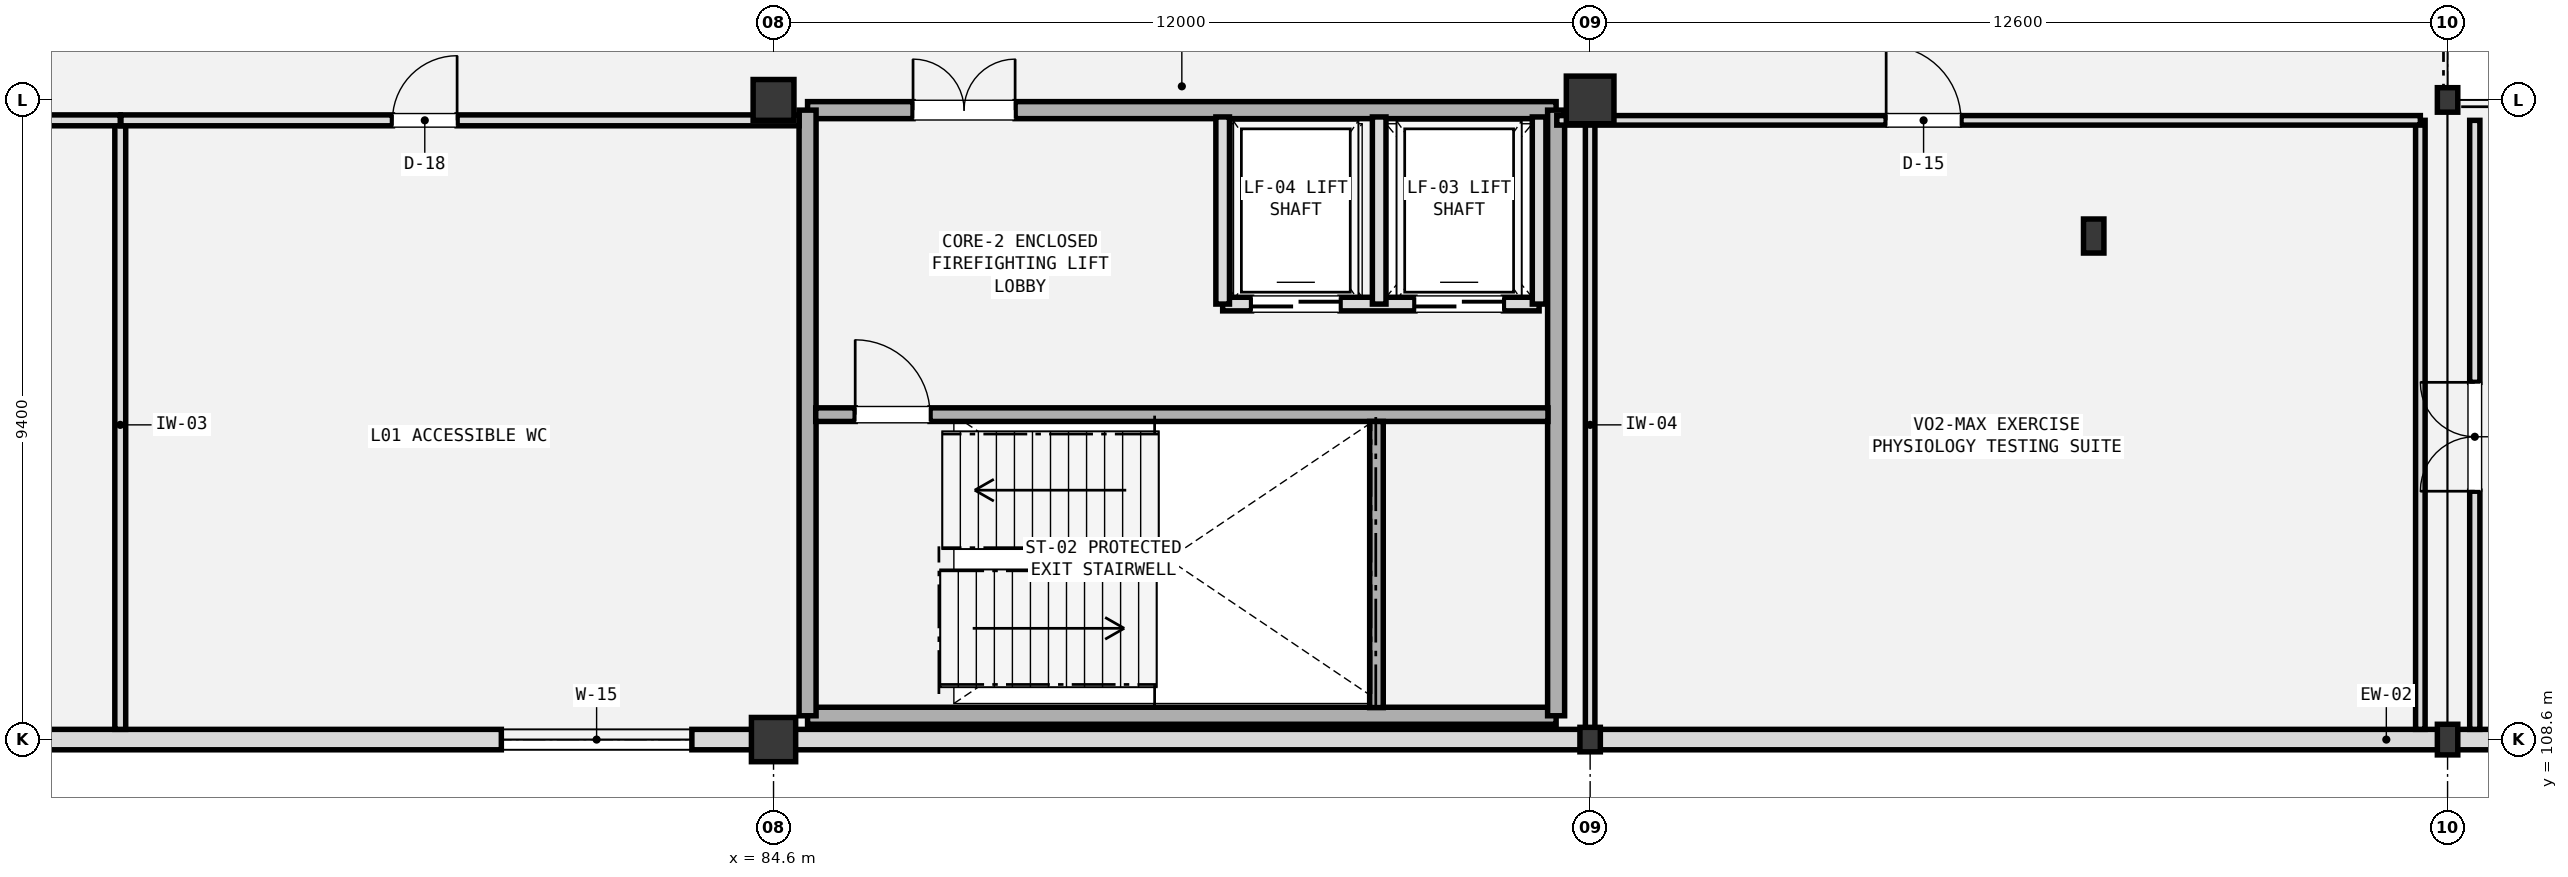
"""IFC4 building model, lengths in metres.
Left out: names, types, materials, properties, quantities, classifications, styles, units other than length and angle.
Written with IfcOpenShell. Run it as: python <this file> out.ifc"""

import sys

from ifc_helpers import new_model, si_unit, direction, frame, frame_2d, origin, origin_2d, place, context, subcontext, project, spatial, rectangle, i_section, extrude, element, fill, save


model = new_model("IFC4")
c1 = context("Model", 3, precision=1e-05, world=origin(), true_north=direction((0.0, 1.0)))
c2 = subcontext(c1, "Body", "Model", "MODEL_VIEW")
j1 = project(units=[si_unit("LENGTHUNIT", "METRE"), si_unit("PLANEANGLEUNIT", "RADIAN")], contexts=[c1])
p1 = place(None, origin())
s1 = spatial("IfcSite", under=j1, at=p1, CompositionType="ELEMENT")
p2 = place(p1, origin())
s2 = spatial("IfcBuilding", under=s1, at=p2, CompositionType="ELEMENT")
p3 = place(p2, frame((0.0, 0.0, 5.4)))
s3 = spatial("IfcBuildingStorey", under=s2, at=p3, CompositionType="ELEMENT", Elevation=5.4)
p4 = place(p3, frame((84.6, 108.6, 0.0), z_axis=(0.0, 0.0, 1.0), x_axis=(1.0, 0.0, 0.0)))
e1 = element("IfcColumn", 1, at=p4, inside=s3, PredefinedType="COLUMN", context=c2, shape_type="SweptSolid", body=[
    extrude(rectangle(XDim=0.65, YDim=0.65, at=origin_2d()), origin(), (0.0, 0.0, 1.0), 4.2),
])
p5 = place(p3, frame((84.6, 118.0, 0.0), z_axis=(0.0, 0.0, 1.0), x_axis=(1.0, 0.0, 0.0)))
e2 = element("IfcColumn", 2, at=p5, inside=s3, PredefinedType="COLUMN", context=c2, shape_type="SweptSolid", body=[
    extrude(rectangle(XDim=0.6, YDim=0.6, at=origin_2d()), origin(), (0.0, 0.0, 1.0), 4.2),
])
p6 = place(p3, frame((96.6, 108.6, 0.0), z_axis=(0.0, 0.0, 1.0), x_axis=(1.0, 0.0, 0.0)))
e3 = element("IfcColumn", 3, at=p6, inside=s3, PredefinedType="PILASTER", context=c2, shape_type="SweptSolid", body=[
    extrude(i_section(OverallWidth=0.3, OverallDepth=0.36, WebThickness=0.012, FlangeThickness=0.022, FilletRadius=0.027, at=origin_2d()), origin(), (0.0, 0.0, 1.0), 4.2),
])
p7 = place(p3, frame((96.6, 118.0, 0.0), z_axis=(0.0, 0.0, 1.0), x_axis=(1.0, 0.0, 0.0)))
e4 = element("IfcColumn", 4, at=p7, inside=s3, PredefinedType="COLUMN", context=c2, shape_type="SweptSolid", body=[
    extrude(rectangle(XDim=0.7, YDim=0.7, at=origin_2d()), origin(), (0.0, 0.0, 1.0), 4.2),
])
p8 = place(p3, frame((104.0, 116.0, 0.0), z_axis=(0.0, 0.0, 1.0), x_axis=(1.0, 0.0, 0.0)))
e5 = element("IfcColumn", 5, at=p8, inside=s3, PredefinedType="COLUMN", context=c2, shape_type="SweptSolid", body=[
    extrude(i_section(OverallWidth=0.3, OverallDepth=0.5, WebThickness=0.014, FlangeThickness=0.028, FilletRadius=0.027, at=origin_2d()), origin(), (0.0, 0.0, 1.0), 4.2),
])
p9 = place(p3, frame((109.2, 108.6, 0.0), z_axis=(0.0, 0.0, 1.0), x_axis=(1.0, 0.0, 0.0)))
e6 = element("IfcColumn", 6, at=p9, inside=s3, PredefinedType="COLUMN", context=c2, shape_type="SweptSolid", body=[
    extrude(i_section(OverallWidth=0.3, OverallDepth=0.45, WebThickness=0.014, FlangeThickness=0.026, FilletRadius=0.027, at=origin_2d()), origin(), (0.0, 0.0, 1.0), 4.2),
])
p10 = place(p3, frame((109.2, 118.0, 0.0), z_axis=(0.0, 0.0, 1.0), x_axis=(1.0, 0.0, 0.0)))
e7 = element("IfcColumn", 7, at=p10, inside=s3, PredefinedType="PILASTER", context=c2, shape_type="SweptSolid", body=[
    extrude(i_section(OverallWidth=0.3, OverallDepth=0.36, WebThickness=0.012, FlangeThickness=0.022, FilletRadius=0.027, at=origin_2d()), origin(), (0.0, 0.0, 1.0), 4.2),
])
p11 = place(p3, frame((60.6, 108.6, 0.0), z_axis=(0.0, 0.0, 1.0), x_axis=(1.0, 0.0, 0.0)))
e8 = element("IfcWall", 8, at=p11, inside=s3, PredefinedType="SOLIDWALL", context=c2, shape_type="SweptSolid", body=[
    extrude(rectangle(XDim=95.4, YDim=0.3, at=frame_2d((47.7, 0.0))), origin(), (0.0, 0.0, 1.0), 3.43),
])
p12 = place(p11, frame((6.0, 0.0, 0.85)))
e9 = element("IfcOpeningElement", 9, at=p12, cuts=e8, PredefinedType="OPENING", context=c2, shape_type="SweptSolid", body=[
    extrude(rectangle(XDim=3.0, YDim=1.65, at=frame_2d((1.5, 0.825))), frame((0.0, 0.16, 0.0), z_axis=(0.0, -1.0, 0.0), x_axis=(1.0, 0.0, 0.0)), (0.0, 0.0, 1.0), 0.32),
])
p13 = place(p11, frame((20.0, 0.0, 0.85)))
e10 = element("IfcOpeningElement", 10, at=p13, cuts=e8, PredefinedType="OPENING", context=c2, shape_type="SweptSolid", body=[
    extrude(rectangle(XDim=2.8, YDim=1.5, at=frame_2d((1.4, 0.75))), frame((0.0, 0.16, 0.0), z_axis=(0.0, -1.0, 0.0), x_axis=(1.0, 0.0, 0.0)), (0.0, 0.0, 1.0), 0.32),
])
p14 = place(p11, frame((54.0, 0.0, 0.85)))
e11 = element("IfcOpeningElement", 11, at=p14, cuts=e8, PredefinedType="OPENING", context=c2, shape_type="SweptSolid", body=[
    extrude(rectangle(XDim=4.4, YDim=1.4, at=frame_2d((2.2, 0.7))), frame((0.0, 0.16, 0.0), z_axis=(0.0, -1.0, 0.0), x_axis=(1.0, 0.0, 0.0)), (0.0, 0.0, 1.0), 0.32),
])
p15 = place(p11, frame((72.0, 0.0, 0.85)))
e12 = element("IfcOpeningElement", 12, at=p15, cuts=e8, PredefinedType="OPENING", context=c2, shape_type="SweptSolid", body=[
    extrude(rectangle(XDim=3.4, YDim=1.4, at=frame_2d((1.7, 0.7))), frame((0.0, 0.16, 0.0), z_axis=(0.0, -1.0, 0.0), x_axis=(1.0, 0.0, 0.0)), (0.0, 0.0, 1.0), 0.32),
])
p16 = place(p3, frame((85.1, 108.95, 0.0), z_axis=(0.0, 0.0, 1.0), x_axis=(1.0, 0.0, 0.0)))
e13 = element("IfcWall", 13, at=p16, inside=s3, PredefinedType="SHEAR", context=c2, shape_type="SweptSolid", body=[
    extrude(rectangle(XDim=11.0, YDim=0.25, at=frame_2d((5.5, 0.0))), origin(), (0.0, 0.0, 1.0), 3.88),
])
p17 = place(p3, frame((85.1, 117.85, 0.0), z_axis=(0.0, 0.0, 1.0), x_axis=(1.0, 0.0, 0.0)))
e14 = element("IfcWall", 14, at=p17, inside=s3, PredefinedType="SHEAR", context=c2, shape_type="SweptSolid", body=[
    extrude(rectangle(XDim=11.0, YDim=0.25, at=frame_2d((5.5, 0.0))), origin(), (0.0, 0.0, 1.0), 3.88),
])
p18 = place(p17, frame((1.55, 0.0, 0.0)))
e15 = element("IfcOpeningElement", 15, at=p18, cuts=e14, PredefinedType="OPENING", context=c2, shape_type="SweptSolid", body=[
    extrude(rectangle(XDim=1.5, YDim=2.2, at=frame_2d((0.75, 1.1))), frame((0.0, 0.135, 0.0), z_axis=(0.0, -1.0, 0.0), x_axis=(1.0, 0.0, 0.0)), (0.0, 0.0, 1.0), 0.27),
])
for number, where, z_axis, x_axis in (
    (16, (85.1, 108.95, 0.0), (0.0, 0.0, 1.0), (0.0, 1.0, 0.0)),
    (17, (96.1, 108.95, 0.0), (0.0, 0.0, 1.0), (0.0, 1.0, 0.0)),
):
    element("IfcWall", number, at=place(p3, frame(where, z_axis=z_axis, x_axis=x_axis)), inside=s3, PredefinedType="SHEAR", context=c2, shape_type="SweptSolid", body=[
        extrude(rectangle(XDim=8.9, YDim=0.25, at=frame_2d((4.45, 0.0))), origin(), (0.0, 0.0, 1.0), 3.88),
    ])
p19 = place(p3, frame((85.22, 113.375, 0.0), z_axis=(0.0, 0.0, 1.0), x_axis=(1.0, 0.0, 0.0)))
e18 = element("IfcWall", 18, at=p19, inside=s3, PredefinedType="SHEAR", context=c2, shape_type="SweptSolid", body=[
    extrude(rectangle(XDim=10.76, YDim=0.2, at=frame_2d((5.38, 0.0))), origin(), (0.0, 0.0, 1.0), 3.88),
])
p20 = place(p19, frame((0.58, 0.0, 0.0)))
e19 = element("IfcOpeningElement", 19, at=p20, cuts=e18, PredefinedType="OPENING", context=c2, shape_type="SweptSolid", body=[
    extrude(rectangle(XDim=1.1, YDim=2.2, at=frame_2d((0.55, 1.1))), frame((0.0, 0.11, 0.0), z_axis=(0.0, -1.0, 0.0), x_axis=(1.0, 0.0, 0.0)), (0.0, 0.0, 1.0), 0.22),
])
p21 = place(p3, frame((93.46, 109.07, 0.0), z_axis=(0.0, 0.0, 1.0), x_axis=(0.0, 1.0, 0.0)))
e20 = element("IfcWall", 20, at=p21, inside=s3, PredefinedType="SHEAR", context=c2, shape_type="SweptSolid", body=[
    extrude(rectangle(XDim=4.205, YDim=0.2, at=frame_2d((2.103, 0.0))), origin(), (0.0, 0.0, 1.0), 3.88),
])
p22 = place(p3, frame((91.2, 115.0, 0.0), z_axis=(0.0, 0.0, 1.0), x_axis=(1.0, 0.0, 0.0)))
e21 = element("IfcWall", 21, at=p22, inside=s3, PredefinedType="SOLIDWALL", context=c2, shape_type="SweptSolid", body=[
    extrude(rectangle(XDim=4.65, YDim=0.2, at=frame_2d((2.325, 0.0))), origin(), (0.0, 0.0, 1.0), 3.52),
])
p23 = place(p22, frame((2.825, 0.0, 0.0)))
e22 = element("IfcOpeningElement", 22, at=p23, cuts=e21, PredefinedType="OPENING", context=c2, shape_type="SweptSolid", body=[
    extrude(rectangle(XDim=1.3, YDim=2.3, at=frame_2d((0.65, 1.15))), frame((0.0, 0.11, 0.0), z_axis=(0.0, -1.0, 0.0), x_axis=(1.0, 0.0, 0.0)), (0.0, 0.0, 1.0), 0.22),
])
p24 = place(p22, frame((0.425, 0.0, 0.0)))
e23 = element("IfcOpeningElement", 23, at=p24, cuts=e21, PredefinedType="OPENING", context=c2, shape_type="SweptSolid", body=[
    extrude(rectangle(XDim=1.3, YDim=2.3, at=frame_2d((0.65, 1.15))), frame((0.0, 0.11, 0.0), z_axis=(0.0, -1.0, 0.0), x_axis=(1.0, 0.0, 0.0)), (0.0, 0.0, 1.0), 0.22),
])
for number, where, z_axis, x_axis in (
    (24, (93.5, 115.0, 0.0), (0.0, 0.0, 1.0), (0.0, 1.0, 0.0)),
    (25, (95.85, 115.0, 0.0), (0.0, 0.0, 1.0), (0.0, 1.0, 0.0)),
    (26, (91.2, 115.0, 0.0), (0.0, 0.0, 1.0), (0.0, 1.0, 0.0)),
):
    element("IfcWall", number, at=place(p3, frame(where, z_axis=z_axis, x_axis=x_axis)), inside=s3, PredefinedType="SOLIDWALL", context=c2, shape_type="SweptSolid", body=[
        extrude(rectangle(XDim=2.75, YDim=0.2, at=frame_2d((1.375, 0.0))), origin(), (0.0, 0.0, 1.0), 3.88),
    ])
p25 = place(p3, frame((109.6, 108.75, 0.0), z_axis=(0.0, 0.0, 1.0), x_axis=(0.0, 1.0, 0.0)))
e27 = element("IfcWall", 27, at=p25, inside=s3, PredefinedType="PARTITIONING", context=c2, shape_type="SweptSolid", body=[
    extrude(rectangle(XDim=8.95, YDim=0.15, at=frame_2d((4.475, 0.0))), origin(), (0.0, 0.0, 1.0), 3.76),
])
p26 = place(p25, frame((3.5, 0.0, 0.0)))
e28 = element("IfcOpeningElement", 28, at=p26, cuts=e27, PredefinedType="OPENING", context=c2, shape_type="SweptSolid", body=[
    extrude(rectangle(XDim=1.6, YDim=2.2, at=frame_2d((0.8, 1.1))), frame((0.0, 0.085, 0.0), z_axis=(0.0, -1.0, 0.0), x_axis=(1.0, 0.0, 0.0)), (0.0, 0.0, 1.0), 0.17),
])
p27 = place(p3, frame((75.0, 108.75, 0.0), z_axis=(0.0, 0.0, 1.0), x_axis=(0.0, 1.0, 0.0)))
e29 = element("IfcWall", 29, at=p27, inside=s3, PredefinedType="PLUMBINGWALL", context=c2, shape_type="SweptSolid", body=[
    extrude(rectangle(XDim=8.95, YDim=0.16, at=frame_2d((4.475, 0.0))), origin(), (0.0, 0.0, 1.0), 2.7),
])
p28 = place(p3, frame((67.61, 117.7, 0.0), z_axis=(0.0, 0.0, 1.0), x_axis=(1.0, 0.0, 0.0)))
e30 = element("IfcWall", 30, at=p28, inside=s3, PredefinedType="PLUMBINGWALL", context=c2, shape_type="SweptSolid", body=[
    extrude(rectangle(XDim=7.39, YDim=0.16, at=frame_2d((3.695, 0.0))), origin(), (0.0, 0.0, 1.0), 2.7),
])
p29 = place(p28, frame((2.99, 0.0, 0.0)))
e31 = element("IfcOpeningElement", 31, at=p29, cuts=e30, PredefinedType="OPENING", context=c2, shape_type="SweptSolid", body=[
    extrude(rectangle(XDim=0.95, YDim=2.15, at=frame_2d((0.475, 1.075))), frame((0.0, 0.09, 0.0), z_axis=(0.0, -1.0, 0.0), x_axis=(1.0, 0.0, 0.0)), (0.0, 0.0, 1.0), 0.18),
])
p30 = place(p3, frame((75.01, 117.7, 0.0), z_axis=(0.0, 0.0, 1.0), x_axis=(1.0, 0.0, 0.0)))
e32 = element("IfcWall", 32, at=p30, inside=s3, PredefinedType="PLUMBINGWALL", context=c2, shape_type="SweptSolid", body=[
    extrude(rectangle(XDim=9.965, YDim=0.16, at=frame_2d((4.982, 0.0))), origin(), (0.0, 0.0, 1.0), 2.7),
])
p31 = place(p30, frame((3.99, 0.0, 0.0)))
e33 = element("IfcOpeningElement", 33, at=p31, cuts=e32, PredefinedType="OPENING", context=c2, shape_type="SweptSolid", body=[
    extrude(rectangle(XDim=0.95, YDim=2.15, at=frame_2d((0.475, 1.075))), frame((0.0, 0.09, 0.0), z_axis=(0.0, -1.0, 0.0), x_axis=(1.0, 0.0, 0.0)), (0.0, 0.0, 1.0), 0.18),
])
for number, where, z_axis, x_axis in (
    (34, (96.6, 108.75, 0.0), (0.0, 0.0, 1.0), (0.0, 1.0, 0.0)),
    (35, (108.8, 108.75, 0.0), (0.0, 0.0, 1.0), (0.0, 1.0, 0.0)),
):
    element("IfcWall", number, at=place(p3, frame(where, z_axis=z_axis, x_axis=x_axis)), inside=s3, PredefinedType="PARTITIONING", context=c2, shape_type="SweptSolid", body=[
        extrude(rectangle(XDim=8.95, YDim=0.14, at=frame_2d((4.475, 0.0))), origin(), (0.0, 0.0, 1.0), 2.7),
    ])
p32 = place(p3, frame((96.11, 117.7, 0.0), z_axis=(0.0, 0.0, 1.0), x_axis=(1.0, 0.0, 0.0)))
e36 = element("IfcWall", 36, at=p32, inside=s3, PredefinedType="PARTITIONING", context=c2, shape_type="SweptSolid", body=[
    extrude(rectangle(XDim=12.69, YDim=0.14, at=frame_2d((6.345, 0.0))), origin(), (0.0, 0.0, 1.0), 2.7),
])
p33 = place(p32, frame((4.84, 0.0, 0.0)))
e37 = element("IfcOpeningElement", 37, at=p33, cuts=e36, PredefinedType="OPENING", context=c2, shape_type="SweptSolid", body=[
    extrude(rectangle(XDim=1.1, YDim=2.2, at=frame_2d((0.55, 1.1))), frame((0.0, 0.08, 0.0), z_axis=(0.0, -1.0, 0.0), x_axis=(1.0, 0.0, 0.0)), (0.0, 0.0, 1.0), 0.16),
])
p34 = place(p13, frame((2.8, 0.0, 0.0), z_axis=(0.0, 0.0, 1.0), x_axis=(-1.0, 0.0, 0.0)))
e38 = element("IfcWindow", 38, at=p34, inside=s3, PartitioningType="DOUBLE_PANEL_HORIZONTAL", PredefinedType="WINDOW", context=c2, shape_type="SweptSolid", body=[
    extrude(rectangle(XDim=2.8, YDim=1.5, at=frame_2d((1.4, 0.75))), frame((0.0, 0.03, 0.0), z_axis=(0.0, -1.0, 0.0), x_axis=(1.0, 0.0, 0.0)), (0.0, 0.0, 1.0), 0.06),
])
fill(e10, e38)
p35 = place(p18, origin())
e39 = element("IfcDoor", 39, at=p35, inside=s3, OperationType="DOUBLE_DOOR_SINGLE_SWING", PredefinedType="DOOR", context=c2, shape_type="SweptSolid", body=[
    extrude(rectangle(XDim=1.5, YDim=2.2, at=frame_2d((0.75, 1.1))), frame((0.0, 0.025, 0.0), z_axis=(0.0, -1.0, 0.0), x_axis=(1.0, 0.0, 0.0)), (0.0, 0.0, 1.0), 0.05),
])
fill(e15, e39)
p36 = place(p20, origin())
e40 = element("IfcDoor", 40, at=p36, inside=s3, OperationType="SINGLE_SWING_LEFT", PredefinedType="DOOR", context=c2, shape_type="SweptSolid", body=[
    extrude(rectangle(XDim=1.1, YDim=2.2, at=frame_2d((0.55, 1.1))), frame((0.0, 0.025, 0.0), z_axis=(0.0, -1.0, 0.0), x_axis=(1.0, 0.0, 0.0)), (0.0, 0.0, 1.0), 0.05),
])
fill(e19, e40)
p37 = place(p23, frame((1.3, 0.0, 0.0), z_axis=(0.0, 0.0, 1.0), x_axis=(-1.0, 0.0, 0.0)))
e41 = element("IfcDoor", 41, at=p37, inside=s3, OperationType="DOUBLE_DOOR_SLIDING", PredefinedType="DOOR", context=c2, shape_type="SweptSolid", body=[
    extrude(rectangle(XDim=1.3, YDim=2.3, at=frame_2d((0.65, 1.15))), frame((0.0, 0.025, 0.0), z_axis=(0.0, -1.0, 0.0), x_axis=(1.0, 0.0, 0.0)), (0.0, 0.0, 1.0), 0.05),
])
fill(e22, e41)
p38 = place(p24, frame((1.3, 0.0, 0.0), z_axis=(0.0, 0.0, 1.0), x_axis=(-1.0, 0.0, 0.0)))
e42 = element("IfcDoor", 42, at=p38, inside=s3, OperationType="DOUBLE_DOOR_SLIDING", PredefinedType="DOOR", context=c2, shape_type="SweptSolid", body=[
    extrude(rectangle(XDim=1.3, YDim=2.3, at=frame_2d((0.65, 1.15))), frame((0.0, 0.025, 0.0), z_axis=(0.0, -1.0, 0.0), x_axis=(1.0, 0.0, 0.0)), (0.0, 0.0, 1.0), 0.05),
])
fill(e23, e42)
p39 = place(p26, origin())
e43 = element("IfcDoor", 43, at=p39, inside=s3, OperationType="DOUBLE_DOOR_SINGLE_SWING", PredefinedType="DOOR", context=c2, shape_type="SweptSolid", body=[
    extrude(rectangle(XDim=1.6, YDim=2.2, at=frame_2d((0.8, 1.1))), frame((0.0, 0.025, 0.0), z_axis=(0.0, -1.0, 0.0), x_axis=(1.0, 0.0, 0.0)), (0.0, 0.0, 1.0), 0.05),
])
fill(e28, e43)
p40 = place(p31, origin())
e44 = element("IfcDoor", 44, at=p40, inside=s3, OperationType="SINGLE_SWING_RIGHT", PredefinedType="DOOR", context=c2, shape_type="SweptSolid", body=[
    extrude(rectangle(XDim=0.95, YDim=2.15, at=frame_2d((0.475, 1.075))), frame((0.0, 0.025, 0.0), z_axis=(0.0, -1.0, 0.0), x_axis=(1.0, 0.0, 0.0)), (0.0, 0.0, 1.0), 0.05),
])
fill(e33, e44)
p41 = place(p33, origin())
e45 = element("IfcDoor", 45, at=p41, inside=s3, OperationType="SINGLE_SWING_LEFT", PredefinedType="DOOR", context=c2, shape_type="SweptSolid", body=[
    extrude(rectangle(XDim=1.1, YDim=2.2, at=frame_2d((0.55, 1.1))), frame((0.0, 0.025, 0.0), z_axis=(0.0, -1.0, 0.0), x_axis=(1.0, 0.0, 0.0)), (0.0, 0.0, 1.0), 0.05),
])
fill(e37, e45)
save(model, sys.argv[1])
